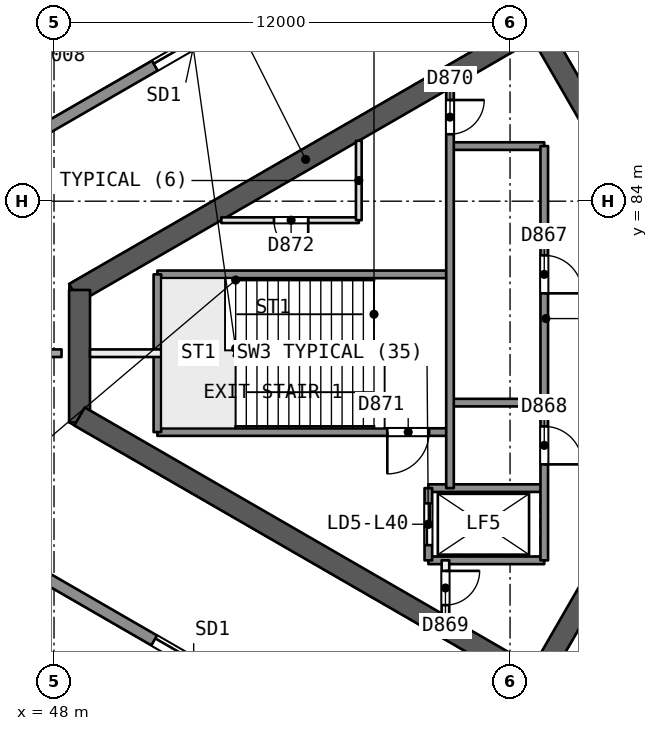
"""IFC4 building model, lengths in metres.
Left out: names, types, materials, properties, quantities, classifications, styles, units other than length and angle.
Written with IfcOpenShell. Run it as: python <this file> out.ifc"""

import sys

from ifc_helpers import new_model, si_unit, direction, frame, frame_2d, origin, place, context, subcontext, project, spatial, rectangle, extrude, element, fill, save


model = new_model("IFC4")
c1 = context("Model", 3, precision=1e-05, world=origin(), true_north=direction((0.0, 1.0)))
c2 = subcontext(c1, "Body", "Model", "MODEL_VIEW")
j1 = project(units=[si_unit("LENGTHUNIT", "METRE"), si_unit("PLANEANGLEUNIT", "RADIAN")], contexts=[c1])
p1 = place(None, origin())
s1 = spatial("IfcSite", under=j1, at=p1, CompositionType="ELEMENT")
p2 = place(p1, origin())
s2 = spatial("IfcBuilding", under=s1, at=p2, CompositionType="ELEMENT")
p3 = place(p2, frame((0.0, 0.0, 167.4)))
s3 = spatial("IfcBuildingStorey", under=s2, at=p3, CompositionType="ELEMENT", Elevation=167.4)
p4 = place(p3, frame((65.682, 80.0, 0.0), z_axis=(0.0, 0.0, 1.0), x_axis=(-0.500000202252, 0.866025287014, 0.0)))
e1 = element("IfcWall", 1, at=p4, inside=s3, PredefinedType="SHEAR", context=c2, shape_type="SweptSolid", body=[
    extrude(rectangle(XDim=10.221, YDim=0.55, at=frame_2d((5.111, 0.0))), origin(), (0.0, 0.0, 1.0), 3.7),
])
p5 = place(p4, frame((0.791, 0.0, 0.0)))
e2 = element("IfcOpeningElement", 2, at=p5, cuts=e1, PredefinedType="OPENING", context=c2, shape_type="SweptSolid", body=[
    extrude(rectangle(XDim=1.2, YDim=2.1, at=frame_2d((0.6, 1.05))), frame((0.0, 0.286, 0.0), z_axis=(0.0, -1.0, 0.0), x_axis=(1.0, 0.0, 0.0)), (0.0, 0.0, 1.0), 0.571),
])
p6 = place(p3, frame((60.709, 88.614, 0.0), z_axis=(0.0, 0.0, 1.0), x_axis=(-0.866020164116, -0.500009075263, 0.0)))
e3 = element("IfcWall", 3, at=p6, inside=s3, PredefinedType="SHEAR", context=c2, shape_type="SweptSolid", body=[
    extrude(rectangle(XDim=14.058, YDim=0.55, at=frame_2d((7.029, 0.0))), origin(), (0.0, 0.0, 1.0), 3.7),
])
p7 = place(p3, frame((48.672, 81.664, 0.0), z_axis=(0.0, 0.0, 1.0), x_axis=(0.0, -1.0, 0.0)))
e4 = element("IfcWall", 4, at=p7, inside=s3, PredefinedType="SHEAR", context=c2, shape_type="SweptSolid", body=[
    extrude(rectangle(XDim=3.487, YDim=0.55, at=frame_2d((1.743, 0.0))), origin(), (0.0, 0.0, 1.0), 3.7),
])
p8 = place(p3, frame((48.672, 78.336, 0.0), z_axis=(0.0, 0.0, 1.0), x_axis=(0.866023530946, -0.500003243837, 0.0)))
e5 = element("IfcWall", 5, at=p8, inside=s3, PredefinedType="SHEAR", context=c2, shape_type="SweptSolid", body=[
    extrude(rectangle(XDim=14.175, YDim=0.55, at=frame_2d((7.087, 0.0))), origin(), (0.0, 0.0, 1.0), 3.7),
])
p9 = place(p3, frame((60.709, 71.386, 0.0), z_axis=(0.0, 0.0, 1.0), x_axis=(0.500015938302, 0.866016201606, 0.0)))
e6 = element("IfcWall", 6, at=p9, inside=s3, PredefinedType="SHEAR", context=c2, shape_type="SweptSolid", body=[
    extrude(rectangle(XDim=10.105, YDim=0.55, at=frame_2d((5.053, 0.0))), origin(), (0.0, 0.0, 1.0), 3.7),
])
p10 = place(p9, frame((7.955, 0.0, 0.0)))
e7 = element("IfcOpeningElement", 7, at=p10, cuts=e6, PredefinedType="OPENING", context=c2, shape_type="SweptSolid", body=[
    extrude(rectangle(XDim=1.2, YDim=2.1, at=frame_2d((0.6, 1.05))), frame((0.0, 0.286, 0.0), z_axis=(0.0, -1.0, 0.0), x_axis=(1.0, 0.0, 0.0)), (0.0, 0.0, 1.0), 0.571),
])
p11 = place(p3, frame((66.129, 83.077, 0.0), z_axis=(0.0, 0.0, 1.0), x_axis=(-0.5000018851, 0.866024315419, 0.0)))
e8 = element("IfcWall", 8, at=p11, inside=s3, PredefinedType="PARTITIONING", context=c2, shape_type="SweptSolid", body=[
    extrude(rectangle(XDim=9.0, YDim=0.2, at=frame_2d((4.5, 0.0))), origin(), (0.0, 0.0, 1.0), 3.25),
])
p12 = place(p3, frame((42.468, 80.0, 0.0), z_axis=(0.0, 0.0, 1.0), x_axis=(1.0, 0.0, 0.0)))
e9 = element("IfcWall", 9, at=p12, inside=s3, PredefinedType="PARTITIONING", context=c2, shape_type="SweptSolid", body=[
    extrude(rectangle(XDim=5.73, YDim=0.2, at=frame_2d((2.865, 0.0))), origin(), (0.0, 0.0, 1.0), 3.25),
])
p13 = place(p3, frame((42.319, 82.755, 0.0), z_axis=(0.0, 0.0, 1.0), x_axis=(0.866024017239, 0.50000240156, 0.0)))
e10 = element("IfcWall", 10, at=p13, inside=s3, PredefinedType="SOLIDWALL", context=c2, shape_type="SweptSolid", body=[
    extrude(rectangle(XDim=53.85, YDim=0.3, at=frame_2d((26.925, 0.0))), origin(), (0.0, 0.0, 1.0), 3.25),
])
p14 = place(p13, frame((20.581, 0.0, 0.0)))
e11 = element("IfcOpeningElement", 11, at=p14, cuts=e10, PredefinedType="OPENING", context=c2, shape_type="SweptSolid", body=[
    extrude(rectangle(XDim=2.4, YDim=2.4, at=frame_2d((1.2, 1.2))), frame((0.0, 0.161, 0.0), z_axis=(0.0, -1.0, 0.0), x_axis=(1.0, 0.0, 0.0)), (0.0, 0.0, 1.0), 0.321),
])
p15 = place(p13, frame((9.622, 0.0, 0.0)))
e12 = element("IfcOpeningElement", 12, at=p15, cuts=e10, PredefinedType="OPENING", context=c2, shape_type="SweptSolid", body=[
    extrude(rectangle(XDim=2.4, YDim=2.4, at=frame_2d((1.2, 1.2))), frame((0.0, 0.161, 0.0), z_axis=(0.0, -1.0, 0.0), x_axis=(1.0, 0.0, 0.0)), (0.0, 0.0, 1.0), 0.321),
])
p16 = place(p13, frame((40.79, 0.0, 0.0)))
e13 = element("IfcOpeningElement", 13, at=p16, cuts=e10, PredefinedType="OPENING", context=c2, shape_type="SweptSolid", body=[
    extrude(rectangle(XDim=2.4, YDim=2.4, at=frame_2d((1.2, 1.2))), frame((0.0, 0.161, 0.0), z_axis=(0.0, -1.0, 0.0), x_axis=(1.0, 0.0, 0.0)), (0.0, 0.0, 1.0), 0.321),
])
p17 = place(p13, frame((27.74, 0.0, 0.9)))
e14 = element("IfcOpeningElement", 14, at=p17, cuts=e10, PredefinedType="OPENING", context=c2, shape_type="SweptSolid", body=[
    extrude(rectangle(XDim=1.8, YDim=1.5, at=frame_2d((0.9, 0.75))), frame((0.0, 0.161, 0.0), z_axis=(0.0, -1.0, 0.0), x_axis=(1.0, 0.0, 0.0)), (0.0, 0.0, 1.0), 0.321),
])
p18 = place(p13, frame((24.934, 0.0, 0.9)))
e15 = element("IfcOpeningElement", 15, at=p18, cuts=e10, PredefinedType="OPENING", context=c2, shape_type="SweptSolid", body=[
    extrude(rectangle(XDim=1.8, YDim=1.5, at=frame_2d((0.9, 0.75))), frame((0.0, 0.161, 0.0), z_axis=(0.0, -1.0, 0.0), x_axis=(1.0, 0.0, 0.0)), (0.0, 0.0, 1.0), 0.321),
])
p19 = place(p3, frame((88.955, 50.32, 0.0), z_axis=(0.0, 0.0, 1.0), x_axis=(-0.866024017239, 0.50000240156, 0.0)))
e16 = element("IfcWall", 16, at=p19, inside=s3, PredefinedType="SOLIDWALL", context=c2, shape_type="SweptSolid", body=[
    extrude(rectangle(XDim=53.85, YDim=0.3, at=frame_2d((26.925, 0.0))), origin(), (0.0, 0.0, 1.0), 3.25),
])
p20 = place(p19, frame((30.557, 0.0, 0.0)))
e17 = element("IfcOpeningElement", 17, at=p20, cuts=e16, PredefinedType="OPENING", context=c2, shape_type="SweptSolid", body=[
    extrude(rectangle(XDim=2.4, YDim=2.4, at=frame_2d((1.2, 1.2))), frame((0.0, 0.161, 0.0), z_axis=(0.0, -1.0, 0.0), x_axis=(1.0, 0.0, 0.0)), (0.0, 0.0, 1.0), 0.321),
])
p21 = place(p19, frame((41.847, 0.0, 0.0)))
e18 = element("IfcOpeningElement", 18, at=p21, cuts=e16, PredefinedType="OPENING", context=c2, shape_type="SweptSolid", body=[
    extrude(rectangle(XDim=2.4, YDim=2.4, at=frame_2d((1.2, 1.2))), frame((0.0, 0.161, 0.0), z_axis=(0.0, -1.0, 0.0), x_axis=(1.0, 0.0, 0.0)), (0.0, 0.0, 1.0), 0.321),
])
p22 = place(p19, frame((10.349, 0.0, 0.0)))
e19 = element("IfcOpeningElement", 19, at=p22, cuts=e16, PredefinedType="OPENING", context=c2, shape_type="SweptSolid", body=[
    extrude(rectangle(XDim=2.4, YDim=2.4, at=frame_2d((1.2, 1.2))), frame((0.0, 0.161, 0.0), z_axis=(0.0, -1.0, 0.0), x_axis=(1.0, 0.0, 0.0)), (0.0, 0.0, 1.0), 0.321),
])
p23 = place(p19, frame((25.09, 0.0, 0.9)))
e20 = element("IfcOpeningElement", 20, at=p23, cuts=e16, PredefinedType="OPENING", context=c2, shape_type="SweptSolid", body=[
    extrude(rectangle(XDim=1.8, YDim=1.5, at=frame_2d((0.9, 0.75))), frame((0.0, 0.161, 0.0), z_axis=(0.0, -1.0, 0.0), x_axis=(1.0, 0.0, 0.0)), (0.0, 0.0, 1.0), 0.321),
])
p24 = place(p3, frame((60.9, 85.45, 0.0), z_axis=(0.0, 0.0, 1.0), x_axis=(-1.0, 0.0, 0.0)))
e21 = element("IfcWall", 21, at=p24, inside=s3, PredefinedType="SOLIDWALL", context=c2, shape_type="SweptSolid", body=[
    extrude(rectangle(XDim=2.48, YDim=0.2, at=frame_2d((1.24, 0.0))), origin(), (0.0, 0.0, 1.0), 3.25),
])
p25 = place(p3, frame((56.02, 83.5, 0.0), z_axis=(0.0, 0.0, 1.0), x_axis=(-1.0, 0.0, 0.0)))
e22 = element("IfcWall", 22, at=p25, inside=s3, PredefinedType="PARTITIONING", context=c2, shape_type="SweptSolid", body=[
    extrude(rectangle(XDim=3.618, YDim=0.15, at=frame_2d((1.809, 0.0))), origin(), (0.0, 0.0, 1.0), 3.25),
])
p26 = place(p25, frame((1.332, 0.0, 0.0)))
e23 = element("IfcOpeningElement", 23, at=p26, cuts=e22, PredefinedType="OPENING", context=c2, shape_type="SweptSolid", body=[
    extrude(rectangle(XDim=0.9, YDim=2.1, at=frame_2d((0.45, 1.05))), frame((0.0, 0.085, 0.0), z_axis=(0.0, -1.0, 0.0), x_axis=(1.0, 0.0, 0.0)), (0.0, 0.0, 1.0), 0.171),
])
p27 = place(p3, frame((58.42, 82.075, 0.0), z_axis=(0.0, 0.0, 1.0), x_axis=(-1.0, 0.0, 0.0)))
e24 = element("IfcWall", 24, at=p27, inside=s3, PredefinedType="SOLIDWALL", context=c2, shape_type="SweptSolid", body=[
    extrude(rectangle(XDim=7.7, YDim=0.2, at=frame_2d((3.85, 0.0))), origin(), (0.0, 0.0, 1.0), 3.25),
])
p28 = place(p3, frame((50.82, 80.0, 0.0), z_axis=(0.0, 0.0, 1.0), x_axis=(-1.0, 0.0, 0.0)))
e25 = element("IfcWall", 25, at=p28, inside=s3, PredefinedType="PARTITIONING", context=c2, shape_type="SweptSolid", body=[
    extrude(rectangle(XDim=1.873, YDim=0.2, at=frame_2d((0.937, 0.0))), origin(), (0.0, 0.0, 1.0), 3.25),
])
p29 = place(p3, frame((60.9, 78.7, 0.0), z_axis=(0.0, 0.0, 1.0), x_axis=(-1.0, 0.0, 0.0)))
e26 = element("IfcWall", 26, at=p29, inside=s3, PredefinedType="SOLIDWALL", context=c2, shape_type="SweptSolid", body=[
    extrude(rectangle(XDim=2.48, YDim=0.2, at=frame_2d((1.24, 0.0))), origin(), (0.0, 0.0, 1.0), 3.25),
])
p30 = place(p3, frame((58.42, 77.925, 0.0), z_axis=(0.0, 0.0, 1.0), x_axis=(-1.0, 0.0, 0.0)))
e27 = element("IfcWall", 27, at=p30, inside=s3, PredefinedType="SOLIDWALL", context=c2, shape_type="SweptSolid", body=[
    extrude(rectangle(XDim=7.7, YDim=0.2, at=frame_2d((3.85, 0.0))), origin(), (0.0, 0.0, 1.0), 3.25),
])
p31 = place(p30, frame((0.55, 0.0, 0.0)))
e28 = element("IfcOpeningElement", 28, at=p31, cuts=e27, PredefinedType="OPENING", context=c2, shape_type="SweptSolid", body=[
    extrude(rectangle(XDim=1.1, YDim=2.1, at=frame_2d((0.55, 1.05))), frame((0.0, 0.11, 0.0), z_axis=(0.0, -1.0, 0.0), x_axis=(1.0, 0.0, 0.0)), (0.0, 0.0, 1.0), 0.221),
])
for number, where, z_axis, x_axis in (
    (29, (60.9, 76.45, 0.0), (0.0, 0.0, 1.0), (-1.0, 0.0, 0.0)),
    (30, (60.9, 74.55, 0.0), (0.0, 0.0, 1.0), (-1.0, 0.0, 0.0)),
):
    element("IfcWall", number, at=place(p3, frame(where, z_axis=z_axis, x_axis=x_axis)), inside=s3, PredefinedType="SOLIDWALL", context=c2, shape_type="SweptSolid", body=[
        extrude(rectangle(XDim=3.05, YDim=0.2, at=frame_2d((1.525, 0.0))), origin(), (0.0, 0.0, 1.0), 3.25),
    ])
p32 = place(p3, frame((60.9, 85.45, 0.0), z_axis=(0.0, 0.0, 1.0), x_axis=(0.0, -1.0, 0.0)))
e31 = element("IfcWall", 31, at=p32, inside=s3, PredefinedType="SOLIDWALL", context=c2, shape_type="SweptSolid", body=[
    extrude(rectangle(XDim=10.9, YDim=0.2, at=frame_2d((5.45, 0.0))), origin(), (0.0, 0.0, 1.0), 3.25),
])
p33 = place(p32, frame((2.875, 0.0, 0.0)))
e32 = element("IfcOpeningElement", 32, at=p33, cuts=e31, PredefinedType="OPENING", context=c2, shape_type="SweptSolid", body=[
    extrude(rectangle(XDim=1.0, YDim=2.1, at=frame_2d((0.5, 1.05))), frame((0.0, 0.11, 0.0), z_axis=(0.0, -1.0, 0.0), x_axis=(1.0, 0.0, 0.0)), (0.0, 0.0, 1.0), 0.221),
])
p34 = place(p32, frame((7.375, 0.0, 0.0)))
e33 = element("IfcOpeningElement", 33, at=p34, cuts=e31, PredefinedType="OPENING", context=c2, shape_type="SweptSolid", body=[
    extrude(rectangle(XDim=1.0, YDim=2.1, at=frame_2d((0.5, 1.05))), frame((0.0, 0.11, 0.0), z_axis=(0.0, -1.0, 0.0), x_axis=(1.0, 0.0, 0.0)), (0.0, 0.0, 1.0), 0.221),
])
p35 = place(p3, frame((58.42, 86.974, 0.0), z_axis=(0.0, 0.0, 1.0), x_axis=(0.0, -1.0, 0.0)))
e34 = element("IfcWall", 34, at=p35, inside=s3, PredefinedType="SOLIDWALL", context=c2, shape_type="SweptSolid", body=[
    extrude(rectangle(XDim=10.524, YDim=0.2, at=frame_2d((5.262, 0.0))), origin(), (0.0, 0.0, 1.0), 3.25),
])
p36 = place(p35, frame((0.312, 0.0, 0.0)))
e35 = element("IfcOpeningElement", 35, at=p36, cuts=e34, PredefinedType="OPENING", context=c2, shape_type="SweptSolid", body=[
    extrude(rectangle(XDim=0.9, YDim=2.1, at=frame_2d((0.45, 1.05))), frame((0.0, 0.11, 0.0), z_axis=(0.0, -1.0, 0.0), x_axis=(1.0, 0.0, 0.0)), (0.0, 0.0, 1.0), 0.221),
])
p37 = place(p3, frame((58.3, 74.55, 0.0), z_axis=(0.0, 0.0, 1.0), x_axis=(0.0, -1.0, 0.0)))
e36 = element("IfcWall", 36, at=p37, inside=s3, PredefinedType="PARTITIONING", context=c2, shape_type="SweptSolid", body=[
    extrude(rectangle(XDim=1.455, YDim=0.2, at=frame_2d((0.728, 0.0))), origin(), (0.0, 0.0, 1.0), 3.25),
])
p38 = place(p37, frame((0.278, 0.0, 0.0)))
e37 = element("IfcOpeningElement", 37, at=p38, cuts=e36, PredefinedType="OPENING", context=c2, shape_type="SweptSolid", body=[
    extrude(rectangle(XDim=0.9, YDim=2.1, at=frame_2d((0.45, 1.05))), frame((0.0, 0.11, 0.0), z_axis=(0.0, -1.0, 0.0), x_axis=(1.0, 0.0, 0.0)), (0.0, 0.0, 1.0), 0.221),
])
p39 = place(p3, frame((57.85, 76.45, 0.0), z_axis=(0.0, 0.0, 1.0), x_axis=(0.0, -1.0, 0.0)))
e38 = element("IfcWall", 38, at=p39, inside=s3, PredefinedType="SOLIDWALL", context=c2, shape_type="SweptSolid", body=[
    extrude(rectangle(XDim=1.9, YDim=0.2, at=frame_2d((0.95, 0.0))), origin(), (0.0, 0.0, 1.0), 3.25),
])
p40 = place(p39, frame((0.4, 0.0, 0.0)))
e39 = element("IfcOpeningElement", 39, at=p40, cuts=e38, PredefinedType="OPENING", context=c2, shape_type="SweptSolid", body=[
    extrude(rectangle(XDim=1.1, YDim=2.1, at=frame_2d((0.55, 1.05))), frame((0.0, 0.11, 0.0), z_axis=(0.0, -1.0, 0.0), x_axis=(1.0, 0.0, 0.0)), (0.0, 0.0, 1.0), 0.221),
])
p41 = place(p3, frame((56.02, 85.589, 0.0), z_axis=(0.0, 0.0, 1.0), x_axis=(0.0, -1.0, 0.0)))
e40 = element("IfcWall", 40, at=p41, inside=s3, PredefinedType="PARTITIONING", context=c2, shape_type="SweptSolid", body=[
    extrude(rectangle(XDim=2.089, YDim=0.15, at=frame_2d((1.044, 0.0))), origin(), (0.0, 0.0, 1.0), 3.25),
])
p42 = place(p3, frame((50.72, 82.075, 0.0), z_axis=(0.0, 0.0, 1.0), x_axis=(0.0, -1.0, 0.0)))
e41 = element("IfcWall", 41, at=p42, inside=s3, PredefinedType="SOLIDWALL", context=c2, shape_type="SweptSolid", body=[
    extrude(rectangle(XDim=4.15, YDim=0.2, at=frame_2d((2.075, 0.0))), origin(), (0.0, 0.0, 1.0), 3.25),
])
p43 = place(p15, origin())
e42 = element("IfcDoor", 42, at=p43, inside=s3, OperationType="SLIDING_TO_RIGHT", PredefinedType="NOTDEFINED", context=c2, shape_type="SweptSolid", body=[
    extrude(rectangle(XDim=2.4, YDim=2.4, at=frame_2d((1.2, 1.2))), frame((0.0, 0.025, 0.0), z_axis=(0.0, -1.0, 0.0), x_axis=(1.0, 0.0, 0.0)), (0.0, 0.0, 1.0), 0.05),
])
fill(e12, e42)
p44 = place(p21, origin())
e43 = element("IfcDoor", 43, at=p44, inside=s3, OperationType="SLIDING_TO_RIGHT", PredefinedType="NOTDEFINED", context=c2, shape_type="SweptSolid", body=[
    extrude(rectangle(XDim=2.4, YDim=2.4, at=frame_2d((1.2, 1.2))), frame((0.0, 0.025, 0.0), z_axis=(0.0, -1.0, 0.0), x_axis=(1.0, 0.0, 0.0)), (0.0, 0.0, 1.0), 0.05),
])
fill(e18, e43)
p45 = place(p40, origin())
e44 = element("IfcDoor", 44, at=p45, inside=s3, OperationType="SLIDING_TO_RIGHT", PredefinedType="NOTDEFINED", context=c2, shape_type="SweptSolid", body=[
    extrude(rectangle(XDim=1.1, YDim=2.1, at=frame_2d((0.55, 1.05))), frame((0.0, 0.025, 0.0), z_axis=(0.0, -1.0, 0.0), x_axis=(1.0, 0.0, 0.0)), (0.0, 0.0, 1.0), 0.05),
])
fill(e39, e44)
p46 = place(p33, origin())
e45 = element("IfcDoor", 45, at=p46, inside=s3, OperationType="SINGLE_SWING_RIGHT", PredefinedType="NOTDEFINED", context=c2, shape_type="SweptSolid", body=[
    extrude(rectangle(XDim=1.0, YDim=2.1, at=frame_2d((0.5, 1.05))), frame((0.0, 0.025, 0.0), z_axis=(0.0, -1.0, 0.0), x_axis=(1.0, 0.0, 0.0)), (0.0, 0.0, 1.0), 0.05),
])
fill(e32, e45)
p47 = place(p34, origin())
e46 = element("IfcDoor", 46, at=p47, inside=s3, OperationType="SINGLE_SWING_RIGHT", PredefinedType="NOTDEFINED", context=c2, shape_type="SweptSolid", body=[
    extrude(rectangle(XDim=1.0, YDim=2.1, at=frame_2d((0.5, 1.05))), frame((0.0, 0.025, 0.0), z_axis=(0.0, -1.0, 0.0), x_axis=(1.0, 0.0, 0.0)), (0.0, 0.0, 1.0), 0.05),
])
fill(e33, e46)
p48 = place(p38, origin())
e47 = element("IfcDoor", 47, at=p48, inside=s3, OperationType="SINGLE_SWING_LEFT", PredefinedType="NOTDEFINED", context=c2, shape_type="SweptSolid", body=[
    extrude(rectangle(XDim=0.9, YDim=2.1, at=frame_2d((0.45, 1.05))), frame((0.0, 0.025, 0.0), z_axis=(0.0, -1.0, 0.0), x_axis=(1.0, 0.0, 0.0)), (0.0, 0.0, 1.0), 0.05),
])
fill(e37, e47)
p49 = place(p36, origin())
e48 = element("IfcDoor", 48, at=p49, inside=s3, OperationType="SINGLE_SWING_LEFT", PredefinedType="NOTDEFINED", context=c2, shape_type="SweptSolid", body=[
    extrude(rectangle(XDim=0.9, YDim=2.1, at=frame_2d((0.45, 1.05))), frame((0.0, 0.025, 0.0), z_axis=(0.0, -1.0, 0.0), x_axis=(1.0, 0.0, 0.0)), (0.0, 0.0, 1.0), 0.05),
])
fill(e35, e48)
p50 = place(p31, origin())
e49 = element("IfcDoor", 49, at=p50, inside=s3, OperationType="SINGLE_SWING_RIGHT", PredefinedType="NOTDEFINED", context=c2, shape_type="SweptSolid", body=[
    extrude(rectangle(XDim=1.1, YDim=2.1, at=frame_2d((0.55, 1.05))), frame((0.0, 0.025, 0.0), z_axis=(0.0, -1.0, 0.0), x_axis=(1.0, 0.0, 0.0)), (0.0, 0.0, 1.0), 0.05),
])
fill(e28, e49)
p51 = place(p26, origin())
e50 = element("IfcDoor", 50, at=p51, inside=s3, OperationType="SINGLE_SWING_LEFT", PredefinedType="NOTDEFINED", context=c2, shape_type="SweptSolid", body=[
    extrude(rectangle(XDim=0.9, YDim=2.1, at=frame_2d((0.45, 1.05))), frame((0.0, 0.025, 0.0), z_axis=(0.0, -1.0, 0.0), x_axis=(1.0, 0.0, 0.0)), (0.0, 0.0, 1.0), 0.05),
])
fill(e23, e50)
save(model, sys.argv[1])
